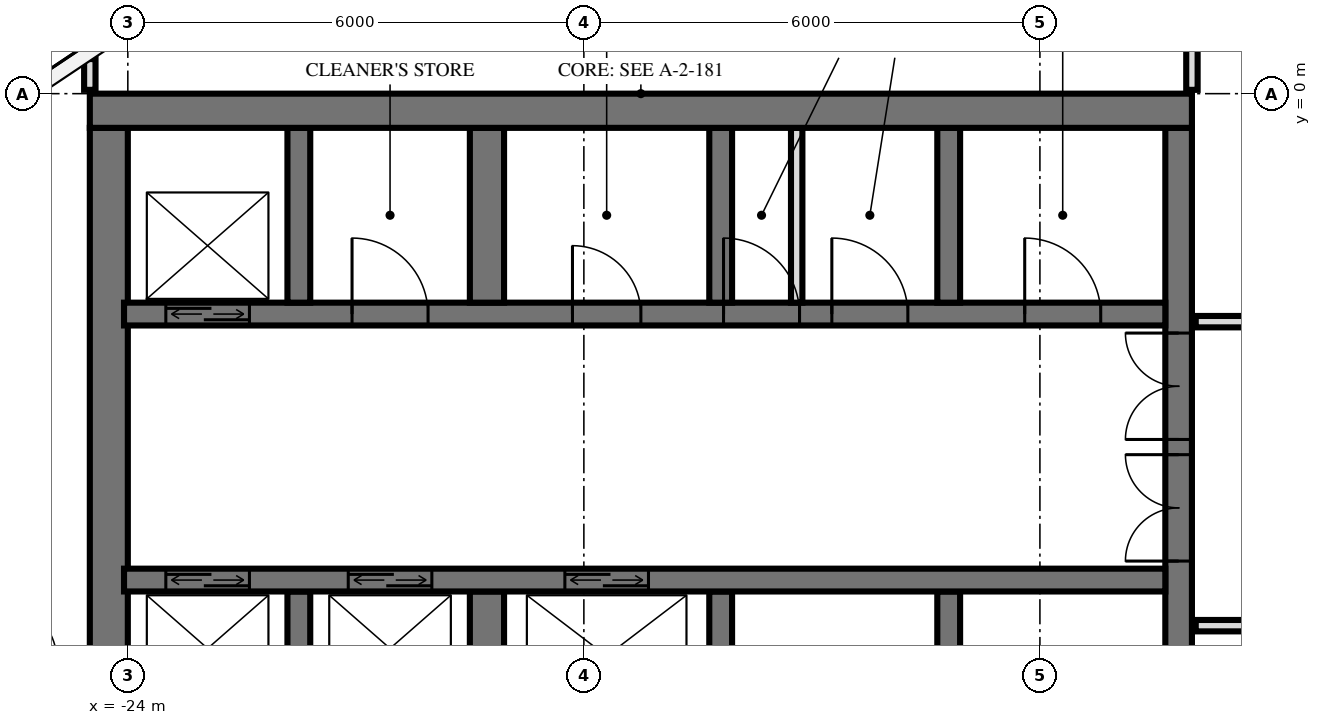
"""IFC4 building model, lengths in metres.
Left out: names, types, materials, properties, quantities, classifications, styles, units other than length and angle.
Written with IfcOpenShell. Run it as: python <this file> out.ifc"""

import sys

from ifc_helpers import new_model, si_unit, direction, frame, frame_2d, origin, place, context, subcontext, project, spatial, rectangle, extrude, element, fill, save


model = new_model("IFC4")
c1 = context("Model", 3, precision=1e-05, world=origin(), true_north=direction((0.0, 1.0)))
c2 = subcontext(c1, "Body", "Model", "MODEL_VIEW")
j1 = project(units=[si_unit("LENGTHUNIT", "METRE"), si_unit("PLANEANGLEUNIT", "RADIAN")], contexts=[c1])
p1 = place(None, origin())
s1 = spatial("IfcSite", under=j1, at=p1, CompositionType="ELEMENT")
p2 = place(p1, origin())
s2 = spatial("IfcBuilding", under=s1, at=p2, CompositionType="ELEMENT")
p3 = place(p2, frame((0.0, 0.0, 177.6)))
s3 = spatial("IfcBuildingStorey", under=s2, at=p3, CompositionType="ELEMENT", Elevation=177.6)
p4 = place(p3, frame((-24.5, -0.225, 0.0), z_axis=(0.0, 0.0, 1.0), x_axis=(1.0, 0.0, 0.0)))
e1 = element("IfcWall", 1, at=p4, inside=s3, PredefinedType="SHEAR", context=c2, shape_type="SweptSolid", body=[
    extrude(rectangle(XDim=14.5, YDim=0.45, at=frame_2d((7.25, 0.0))), origin(), (0.0, 0.0, 1.0), 6.0),
])
p5 = place(p3, frame((-10.175, -14.55, 0.0), z_axis=(0.0, 0.0, 1.0), x_axis=(0.0, 1.0, 0.0)))
e2 = element("IfcWall", 2, at=p5, inside=s3, PredefinedType="SHEAR", context=c2, shape_type="SweptSolid", body=[
    extrude(rectangle(XDim=14.1, YDim=0.35, at=frame_2d((7.05, 0.0))), origin(), (0.0, 0.0, 1.0), 6.0),
])
p6 = place(p5, frame((8.4, 0.0, 0.0)))
e3 = element("IfcOpeningElement", 3, at=p6, cuts=e2, PredefinedType="OPENING", context=c2, shape_type="SweptSolid", body=[
    extrude(rectangle(XDim=1.4, YDim=2.4, at=frame_2d((0.7, 1.2))), frame((0.0, 0.185, 0.0), z_axis=(0.0, -1.0, 0.0), x_axis=(1.0, 0.0, 0.0)), (0.0, 0.0, 1.0), 0.37),
])
p7 = place(p5, frame((10.0, 0.0, 0.0)))
e4 = element("IfcOpeningElement", 4, at=p7, cuts=e2, PredefinedType="OPENING", context=c2, shape_type="SweptSolid", body=[
    extrude(rectangle(XDim=1.4, YDim=2.4, at=frame_2d((0.7, 1.2))), frame((0.0, 0.185, 0.0), z_axis=(0.0, -1.0, 0.0), x_axis=(1.0, 0.0, 0.0)), (0.0, 0.0, 1.0), 0.37),
])
p8 = place(p5, frame((4.0, 0.0, 0.0)))
e5 = element("IfcOpeningElement", 5, at=p8, cuts=e2, PredefinedType="OPENING", context=c2, shape_type="SweptSolid", body=[
    extrude(rectangle(XDim=1.2, YDim=2.1, at=frame_2d((0.6, 1.05))), frame((0.0, 0.185, 0.0), z_axis=(0.0, -1.0, 0.0), x_axis=(1.0, 0.0, 0.0)), (0.0, 0.0, 1.0), 0.37),
])
p9 = place(p3, frame((-24.25, -14.55, 0.0), z_axis=(0.0, 0.0, 1.0), x_axis=(0.0, 1.0, 0.0)))
e6 = element("IfcWall", 6, at=p9, inside=s3, PredefinedType="SHEAR", context=c2, shape_type="SweptSolid", body=[
    extrude(rectangle(XDim=14.1, YDim=0.5, at=frame_2d((7.05, 0.0))), origin(), (0.0, 0.0, 1.0), 6.0),
])
p10 = place(p3, frame((-24.05, -2.9, 0.0), z_axis=(0.0, 0.0, 1.0), x_axis=(1.0, 0.0, 0.0)))
e7 = element("IfcWall", 7, at=p10, inside=s3, PredefinedType="SHEAR", context=c2, shape_type="SweptSolid", body=[
    extrude(rectangle(XDim=13.7, YDim=0.3, at=frame_2d((6.85, 0.0))), origin(), (0.0, 0.0, 1.0), 6.0),
])
p11 = place(p10, frame((0.55, 0.0, 0.0)))
e8 = element("IfcOpeningElement", 8, at=p11, cuts=e7, PredefinedType="OPENING", context=c2, shape_type="SweptSolid", body=[
    extrude(rectangle(XDim=1.1, YDim=2.1, at=frame_2d((0.55, 1.05))), frame((0.0, 0.16, 0.0), z_axis=(0.0, -1.0, 0.0), x_axis=(1.0, 0.0, 0.0)), (0.0, 0.0, 1.0), 0.32),
])
p12 = place(p10, frame((5.9, 0.0, 0.0)))
e9 = element("IfcOpeningElement", 9, at=p12, cuts=e7, PredefinedType="OPENING", context=c2, shape_type="SweptSolid", body=[
    extrude(rectangle(XDim=0.9, YDim=2.1, at=frame_2d((0.45, 1.05))), frame((0.0, 0.16, 0.0), z_axis=(0.0, -1.0, 0.0), x_axis=(1.0, 0.0, 0.0)), (0.0, 0.0, 1.0), 0.32),
])
p13 = place(p10, frame((11.85, 0.0, 0.0)))
e10 = element("IfcOpeningElement", 10, at=p13, cuts=e7, PredefinedType="OPENING", context=c2, shape_type="SweptSolid", body=[
    extrude(rectangle(XDim=1.0, YDim=2.1, at=frame_2d((0.5, 1.05))), frame((0.0, 0.16, 0.0), z_axis=(0.0, -1.0, 0.0), x_axis=(1.0, 0.0, 0.0)), (0.0, 0.0, 1.0), 0.32),
])
p14 = place(p10, frame((9.312, 0.0, 0.0)))
e11 = element("IfcOpeningElement", 11, at=p14, cuts=e7, PredefinedType="OPENING", context=c2, shape_type="SweptSolid", body=[
    extrude(rectangle(XDim=1.0, YDim=2.1, at=frame_2d((0.5, 1.05))), frame((0.0, 0.16, 0.0), z_axis=(0.0, -1.0, 0.0), x_axis=(1.0, 0.0, 0.0)), (0.0, 0.0, 1.0), 0.32),
])
p15 = place(p10, frame((7.887, 0.0, 0.0)))
e12 = element("IfcOpeningElement", 12, at=p15, cuts=e7, PredefinedType="OPENING", context=c2, shape_type="SweptSolid", body=[
    extrude(rectangle(XDim=1.0, YDim=2.1, at=frame_2d((0.5, 1.05))), frame((0.0, 0.16, 0.0), z_axis=(0.0, -1.0, 0.0), x_axis=(1.0, 0.0, 0.0)), (0.0, 0.0, 1.0), 0.32),
])
p16 = place(p10, frame((3.0, 0.0, 0.0)))
e13 = element("IfcOpeningElement", 13, at=p16, cuts=e7, PredefinedType="OPENING", context=c2, shape_type="SweptSolid", body=[
    extrude(rectangle(XDim=1.0, YDim=2.1, at=frame_2d((0.5, 1.05))), frame((0.0, 0.16, 0.0), z_axis=(0.0, -1.0, 0.0), x_axis=(1.0, 0.0, 0.0)), (0.0, 0.0, 1.0), 0.32),
])
p17 = place(p3, frame((-24.05, -6.4, 0.0), z_axis=(0.0, 0.0, 1.0), x_axis=(1.0, 0.0, 0.0)))
e14 = element("IfcWall", 14, at=p17, inside=s3, PredefinedType="SHEAR", context=c2, shape_type="SweptSolid", body=[
    extrude(rectangle(XDim=13.7, YDim=0.3, at=frame_2d((6.85, 0.0))), origin(), (0.0, 0.0, 1.0), 6.0),
])
p18 = place(p17, frame((2.95, 0.0, 0.0)))
e15 = element("IfcOpeningElement", 15, at=p18, cuts=e14, PredefinedType="OPENING", context=c2, shape_type="SweptSolid", body=[
    extrude(rectangle(XDim=1.1, YDim=2.1, at=frame_2d((0.55, 1.05))), frame((0.0, 0.16, 0.0), z_axis=(0.0, -1.0, 0.0), x_axis=(1.0, 0.0, 0.0)), (0.0, 0.0, 1.0), 0.32),
])
p19 = place(p17, frame((0.55, 0.0, 0.0)))
e16 = element("IfcOpeningElement", 16, at=p19, cuts=e14, PredefinedType="OPENING", context=c2, shape_type="SweptSolid", body=[
    extrude(rectangle(XDim=1.1, YDim=2.1, at=frame_2d((0.55, 1.05))), frame((0.0, 0.16, 0.0), z_axis=(0.0, -1.0, 0.0), x_axis=(1.0, 0.0, 0.0)), (0.0, 0.0, 1.0), 0.32),
])
p20 = place(p17, frame((5.8, 0.0, 0.0)))
e17 = element("IfcOpeningElement", 17, at=p20, cuts=e14, PredefinedType="OPENING", context=c2, shape_type="SweptSolid", body=[
    extrude(rectangle(XDim=1.1, YDim=2.1, at=frame_2d((0.55, 1.05))), frame((0.0, 0.16, 0.0), z_axis=(0.0, -1.0, 0.0), x_axis=(1.0, 0.0, 0.0)), (0.0, 0.0, 1.0), 0.32),
])
for number, where, z_axis, x_axis in (
    (18, (-13.2, -2.75, 0.0), (0.0, 0.0, 1.0), (0.0, 1.0, 0.0)),
    (19, (-13.2, -8.85, 0.0), (0.0, 0.0, 1.0), (0.0, 1.0, 0.0)),
    (20, (-16.2, -2.75, 0.0), (0.0, 0.0, 1.0), (0.0, 1.0, 0.0)),
    (21, (-16.2, -8.85, 0.0), (0.0, 0.0, 1.0), (0.0, 1.0, 0.0)),
):
    element("IfcWall", number, at=place(p3, frame(where, z_axis=z_axis, x_axis=x_axis)), inside=s3, PredefinedType="SHEAR", context=c2, shape_type="SweptSolid", body=[
        extrude(rectangle(XDim=2.3, YDim=0.3, at=frame_2d((1.15, 0.0))), origin(), (0.0, 0.0, 1.0), 6.0),
    ])
for number, where, z_axis, x_axis in (
    (22, (-19.275, -2.75, 0.0), (0.0, 0.0, 1.0), (0.0, 1.0, 0.0)),
    (23, (-19.275, -8.85, 0.0), (0.0, 0.0, 1.0), (0.0, 1.0, 0.0)),
):
    element("IfcWall", number, at=place(p3, frame(where, z_axis=z_axis, x_axis=x_axis)), inside=s3, PredefinedType="SHEAR", context=c2, shape_type="SweptSolid", body=[
        extrude(rectangle(XDim=2.3, YDim=0.45, at=frame_2d((1.15, 0.0))), origin(), (0.0, 0.0, 1.0), 6.0),
    ])
for number, where, z_axis, x_axis in (
    (24, (-21.75, -2.75, 0.0), (0.0, 0.0, 1.0), (0.0, 1.0, 0.0)),
    (25, (-21.75, -8.85, 0.0), (0.0, 0.0, 1.0), (0.0, 1.0, 0.0)),
):
    element("IfcWall", number, at=place(p3, frame(where, z_axis=z_axis, x_axis=x_axis)), inside=s3, PredefinedType="SHEAR", context=c2, shape_type="SweptSolid", body=[
        extrude(rectangle(XDim=2.3, YDim=0.3, at=frame_2d((1.15, 0.0))), origin(), (0.0, 0.0, 1.0), 6.0),
    ])
p21 = place(p3, frame((-15.2, -2.75, 0.0), z_axis=(0.0, 0.0, 1.0), x_axis=(0.0, 1.0, 0.0)))
e26 = element("IfcWall", 26, at=p21, inside=s3, PredefinedType="PARTITIONING", context=c2, shape_type="SweptSolid", body=[
    extrude(rectangle(XDim=2.3, YDim=0.15, at=frame_2d((1.15, 0.0))), origin(), (0.0, 0.0, 1.0), 5.7),
])
p22 = place(p3, frame((-10.0, 0.05, 0.0), z_axis=(0.0, 0.0, 1.0), x_axis=(0.0, 1.0, 0.0)))
e27 = element("IfcWall", 27, at=p22, inside=s3, PredefinedType="PARTITIONING", context=c2, shape_type="SweptSolid", body=[
    extrude(rectangle(XDim=0.91, YDim=0.15, at=frame_2d((0.455, 0.0))), origin(), (0.0, 0.0, 1.0), 5.7),
])
p23 = place(p3, frame((-24.5, 0.05, 0.0), z_axis=(0.0, 0.0, 1.0), x_axis=(0.0, 1.0, 0.0)))
e28 = element("IfcWall", 28, at=p23, inside=s3, PredefinedType="PARTITIONING", context=c2, shape_type="SweptSolid", body=[
    extrude(rectangle(XDim=0.405, YDim=0.15, at=frame_2d((0.203, 0.0))), origin(), (0.0, 0.0, 1.0), 5.7),
])
p24 = place(p3, frame((-9.95, -7.0, 0.0), z_axis=(0.0, 0.0, 1.0), x_axis=(1.0, 0.0, 0.0)))
e29 = element("IfcWall", 29, at=p24, inside=s3, PredefinedType="PARTITIONING", context=c2, shape_type="SweptSolid", body=[
    extrude(rectangle(XDim=19.9, YDim=0.15, at=frame_2d((9.95, 0.0))), origin(), (0.0, 0.0, 1.0), 5.7),
])
p25 = place(p24, frame((9.45, 0.0, 0.0)))
e30 = element("IfcOpeningElement", 30, at=p25, cuts=e29, PredefinedType="OPENING", context=c2, shape_type="SweptSolid", body=[
    extrude(rectangle(XDim=1.0, YDim=2.1, at=frame_2d((0.5, 1.05))), frame((0.0, 0.085, 0.0), z_axis=(0.0, -1.0, 0.0), x_axis=(1.0, 0.0, 0.0)), (0.0, 0.0, 1.0), 0.17),
])
p26 = place(p24, frame((2.0, 0.0, 0.0)))
e31 = element("IfcOpeningElement", 31, at=p26, cuts=e29, PredefinedType="OPENING", context=c2, shape_type="SweptSolid", body=[
    extrude(rectangle(XDim=1.0, YDim=2.1, at=frame_2d((0.5, 1.05))), frame((0.0, 0.085, 0.0), z_axis=(0.0, -1.0, 0.0), x_axis=(1.0, 0.0, 0.0)), (0.0, 0.0, 1.0), 0.17),
])
p27 = place(p3, frame((-9.95, -3.0, 0.0), z_axis=(0.0, 0.0, 1.0), x_axis=(1.0, 0.0, 0.0)))
e32 = element("IfcWall", 32, at=p27, inside=s3, PredefinedType="PARTITIONING", context=c2, shape_type="SweptSolid", body=[
    extrude(rectangle(XDim=19.9, YDim=0.15, at=frame_2d((9.95, 0.0))), origin(), (0.0, 0.0, 1.0), 5.7),
])
p28 = place(p27, frame((2.0, 0.0, 0.0)))
e33 = element("IfcOpeningElement", 33, at=p28, cuts=e32, PredefinedType="OPENING", context=c2, shape_type="SweptSolid", body=[
    extrude(rectangle(XDim=1.0, YDim=2.1, at=frame_2d((0.5, 1.05))), frame((0.0, 0.085, 0.0), z_axis=(0.0, -1.0, 0.0), x_axis=(1.0, 0.0, 0.0)), (0.0, 0.0, 1.0), 0.17),
])
p29 = place(p27, frame((6.95, 0.0, 0.0)))
e34 = element("IfcOpeningElement", 34, at=p29, cuts=e32, PredefinedType="OPENING", context=c2, shape_type="SweptSolid", body=[
    extrude(rectangle(XDim=1.0, YDim=2.1, at=frame_2d((0.5, 1.05))), frame((0.0, 0.085, 0.0), z_axis=(0.0, -1.0, 0.0), x_axis=(1.0, 0.0, 0.0)), (0.0, 0.0, 1.0), 0.17),
])
p30 = place(p27, frame((9.7, 0.0, 0.0)))
e35 = element("IfcOpeningElement", 35, at=p30, cuts=e32, PredefinedType="OPENING", context=c2, shape_type="SweptSolid", body=[
    extrude(rectangle(XDim=1.0, YDim=2.1, at=frame_2d((0.5, 1.05))), frame((0.0, 0.085, 0.0), z_axis=(0.0, -1.0, 0.0), x_axis=(1.0, 0.0, 0.0)), (0.0, 0.0, 1.0), 0.17),
])
p31 = place(p27, frame((16.9, 0.0, 0.0)))
e36 = element("IfcOpeningElement", 36, at=p31, cuts=e32, PredefinedType="OPENING", context=c2, shape_type="SweptSolid", body=[
    extrude(rectangle(XDim=1.0, YDim=2.1, at=frame_2d((0.5, 1.05))), frame((0.0, 0.085, 0.0), z_axis=(0.0, -1.0, 0.0), x_axis=(1.0, 0.0, 0.0)), (0.0, 0.0, 1.0), 0.17),
])
p32 = place(p18, origin())
e37 = element("IfcDoor", 37, at=p32, inside=s3, OperationType="DOUBLE_DOOR_SLIDING", PredefinedType="USERDEFINED", context=c2, shape_type="SweptSolid", body=[
    extrude(rectangle(XDim=1.1, YDim=2.1, at=frame_2d((0.55, 1.05))), frame((0.0, 0.025, 0.0), z_axis=(0.0, -1.0, 0.0), x_axis=(1.0, 0.0, 0.0)), (0.0, 0.0, 1.0), 0.05),
])
fill(e15, e37)
p33 = place(p11, origin())
e38 = element("IfcDoor", 38, at=p33, inside=s3, OperationType="DOUBLE_DOOR_SLIDING", PredefinedType="USERDEFINED", context=c2, shape_type="SweptSolid", body=[
    extrude(rectangle(XDim=1.1, YDim=2.1, at=frame_2d((0.55, 1.05))), frame((0.0, 0.025, 0.0), z_axis=(0.0, -1.0, 0.0), x_axis=(1.0, 0.0, 0.0)), (0.0, 0.0, 1.0), 0.05),
])
fill(e8, e38)
p34 = place(p19, origin())
e39 = element("IfcDoor", 39, at=p34, inside=s3, OperationType="DOUBLE_DOOR_SLIDING", PredefinedType="USERDEFINED", context=c2, shape_type="SweptSolid", body=[
    extrude(rectangle(XDim=1.1, YDim=2.1, at=frame_2d((0.55, 1.05))), frame((0.0, 0.025, 0.0), z_axis=(0.0, -1.0, 0.0), x_axis=(1.0, 0.0, 0.0)), (0.0, 0.0, 1.0), 0.05),
])
fill(e16, e39)
p35 = place(p20, origin())
e40 = element("IfcDoor", 40, at=p35, inside=s3, OperationType="DOUBLE_DOOR_SLIDING", PredefinedType="USERDEFINED", context=c2, shape_type="SweptSolid", body=[
    extrude(rectangle(XDim=1.1, YDim=2.1, at=frame_2d((0.55, 1.05))), frame((0.0, 0.025, 0.0), z_axis=(0.0, -1.0, 0.0), x_axis=(1.0, 0.0, 0.0)), (0.0, 0.0, 1.0), 0.05),
])
fill(e17, e40)
p36 = place(p6, origin())
e41 = element("IfcDoor", 41, at=p36, inside=s3, OperationType="DOUBLE_DOOR_SINGLE_SWING", PredefinedType="DOOR", context=c2, shape_type="SweptSolid", body=[
    extrude(rectangle(XDim=1.4, YDim=2.4, at=frame_2d((0.7, 1.2))), frame((0.0, 0.025, 0.0), z_axis=(0.0, -1.0, 0.0), x_axis=(1.0, 0.0, 0.0)), (0.0, 0.0, 1.0), 0.05),
])
fill(e3, e41)
p37 = place(p7, origin())
e42 = element("IfcDoor", 42, at=p37, inside=s3, OperationType="DOUBLE_DOOR_SINGLE_SWING", PredefinedType="DOOR", context=c2, shape_type="SweptSolid", body=[
    extrude(rectangle(XDim=1.4, YDim=2.4, at=frame_2d((0.7, 1.2))), frame((0.0, 0.025, 0.0), z_axis=(0.0, -1.0, 0.0), x_axis=(1.0, 0.0, 0.0)), (0.0, 0.0, 1.0), 0.05),
])
fill(e4, e42)
p38 = place(p12, origin())
e43 = element("IfcDoor", 43, at=p38, inside=s3, OperationType="SINGLE_SWING_RIGHT", PredefinedType="DOOR", context=c2, shape_type="SweptSolid", body=[
    extrude(rectangle(XDim=0.9, YDim=2.1, at=frame_2d((0.45, 1.05))), frame((0.0, 0.025, 0.0), z_axis=(0.0, -1.0, 0.0), x_axis=(1.0, 0.0, 0.0)), (0.0, 0.0, 1.0), 0.05),
])
fill(e9, e43)
p39 = place(p13, origin())
e44 = element("IfcDoor", 44, at=p39, inside=s3, OperationType="SINGLE_SWING_RIGHT", PredefinedType="DOOR", context=c2, shape_type="SweptSolid", body=[
    extrude(rectangle(XDim=1.0, YDim=2.1, at=frame_2d((0.5, 1.05))), frame((0.0, 0.025, 0.0), z_axis=(0.0, -1.0, 0.0), x_axis=(1.0, 0.0, 0.0)), (0.0, 0.0, 1.0), 0.05),
])
fill(e10, e44)
p40 = place(p14, origin())
e45 = element("IfcDoor", 45, at=p40, inside=s3, OperationType="SINGLE_SWING_RIGHT", PredefinedType="DOOR", context=c2, shape_type="SweptSolid", body=[
    extrude(rectangle(XDim=1.0, YDim=2.1, at=frame_2d((0.5, 1.05))), frame((0.0, 0.025, 0.0), z_axis=(0.0, -1.0, 0.0), x_axis=(1.0, 0.0, 0.0)), (0.0, 0.0, 1.0), 0.05),
])
fill(e11, e45)
p41 = place(p15, origin())
e46 = element("IfcDoor", 46, at=p41, inside=s3, OperationType="SINGLE_SWING_RIGHT", PredefinedType="DOOR", context=c2, shape_type="SweptSolid", body=[
    extrude(rectangle(XDim=1.0, YDim=2.1, at=frame_2d((0.5, 1.05))), frame((0.0, 0.025, 0.0), z_axis=(0.0, -1.0, 0.0), x_axis=(1.0, 0.0, 0.0)), (0.0, 0.0, 1.0), 0.05),
])
fill(e12, e46)
p42 = place(p16, origin())
e47 = element("IfcDoor", 47, at=p42, inside=s3, OperationType="SINGLE_SWING_RIGHT", PredefinedType="DOOR", context=c2, shape_type="SweptSolid", body=[
    extrude(rectangle(XDim=1.0, YDim=2.1, at=frame_2d((0.5, 1.05))), frame((0.0, 0.025, 0.0), z_axis=(0.0, -1.0, 0.0), x_axis=(1.0, 0.0, 0.0)), (0.0, 0.0, 1.0), 0.05),
])
fill(e13, e47)
save(model, sys.argv[1])
